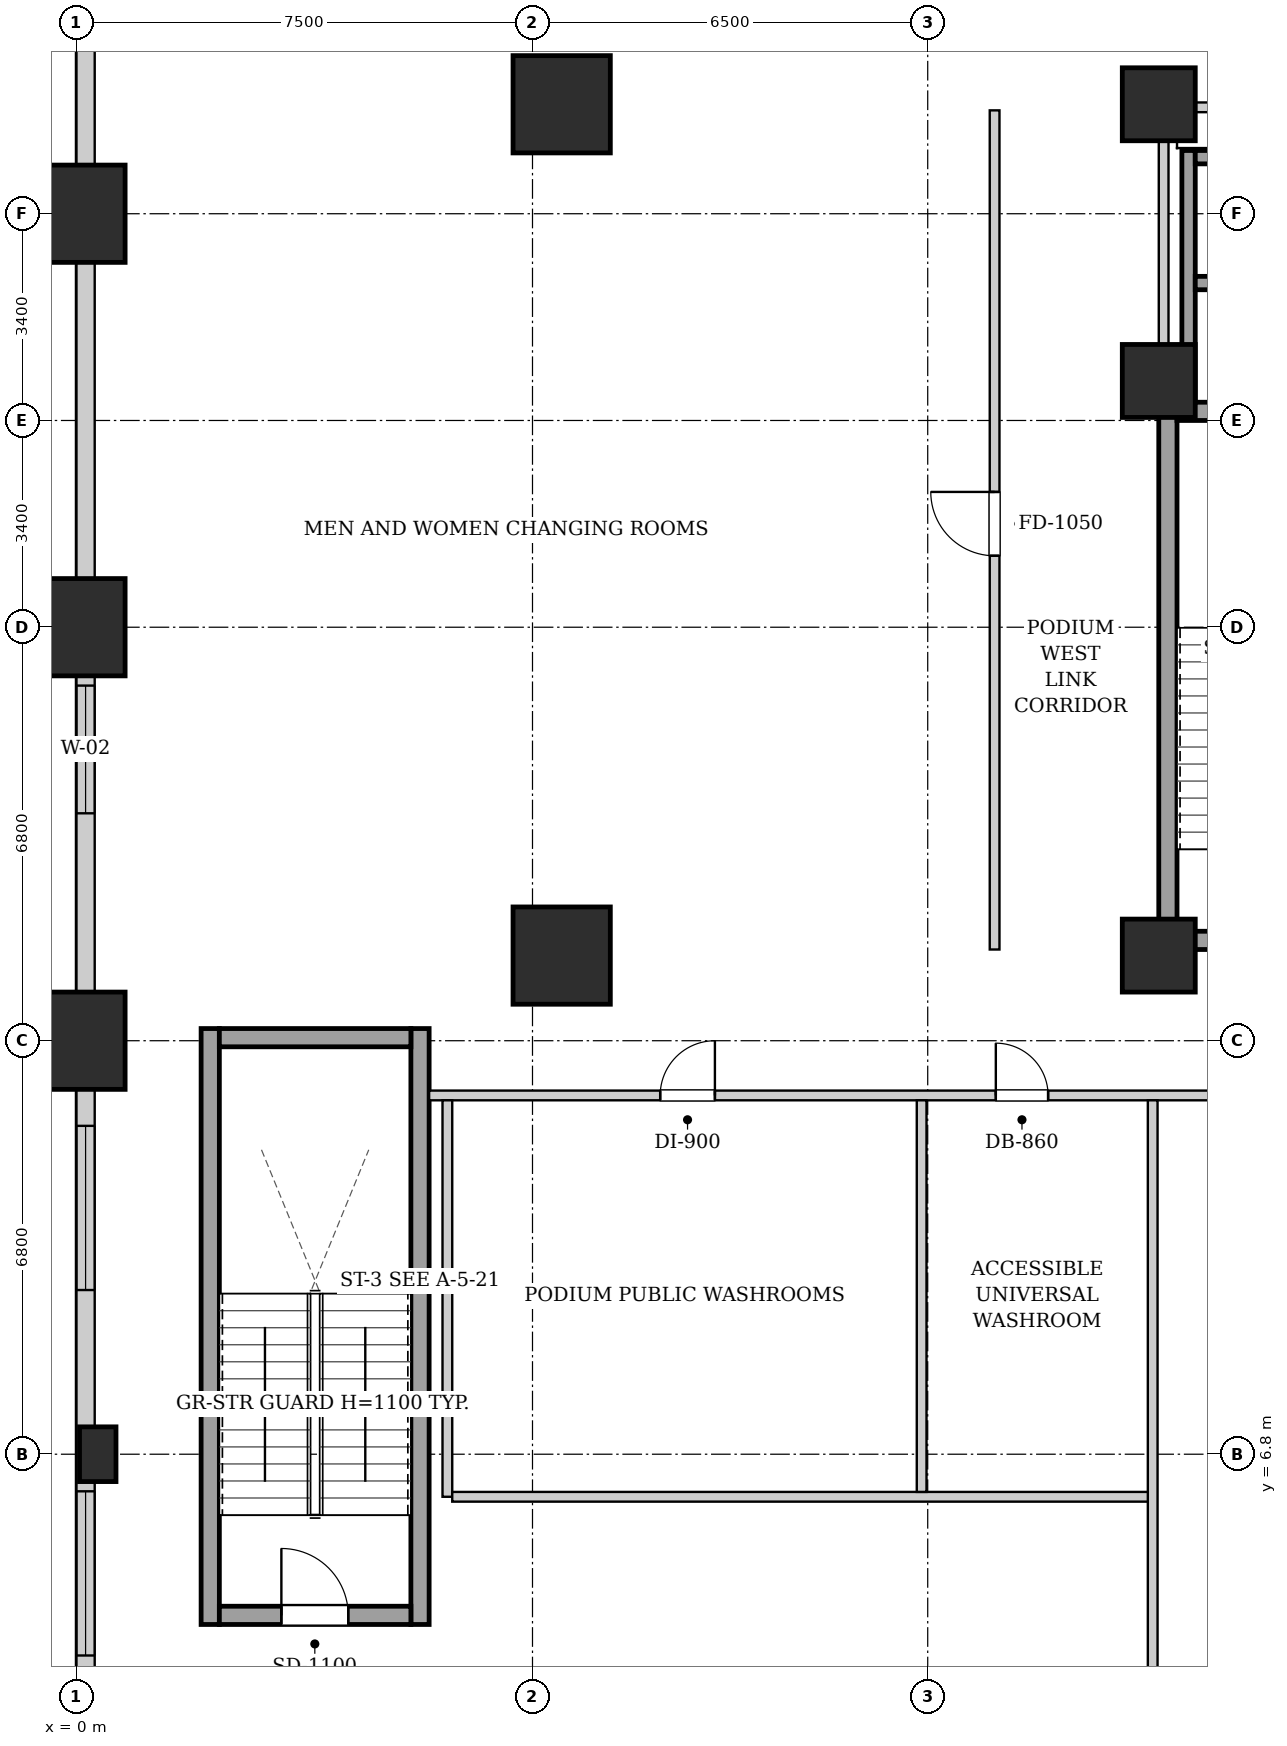
"""IFC4 building model, lengths in metres.
Left out: names, types, materials, properties, quantities, classifications, styles, units other than length and angle.
Written with IfcOpenShell. Run it as: python <this file> out.ifc"""

import sys

from ifc_helpers import new_model, si_unit, direction, frame, frame_2d, origin, origin_2d, place, context, subcontext, project, spatial, rectangle, extrude, element, fill, save


model = new_model("IFC4")
c1 = context("Model", 3, precision=1e-05, world=origin(), true_north=direction((0.0, 1.0)))
c2 = subcontext(c1, "Body", "Model", "MODEL_VIEW")
j1 = project(units=[si_unit("LENGTHUNIT", "METRE"), si_unit("PLANEANGLEUNIT", "RADIAN")], contexts=[c1])
p1 = place(None, origin())
s1 = spatial("IfcSite", under=j1, at=p1, CompositionType="ELEMENT")
p2 = place(p1, origin())
s2 = spatial("IfcBuilding", under=s1, at=p2, CompositionType="ELEMENT")
p3 = place(p2, frame((0.0, 0.0, 16.0)))
s3 = spatial("IfcBuildingStorey", under=s2, at=p3, CompositionType="ELEMENT", Elevation=16.0)
for number, where, z_axis, x_axis in (
    (1, (0.0, 13.6, 0.0), (0.0, 0.0, 1.0), (1.0, 0.0, 0.0)),
    (2, (0.0, 20.4, 0.0), (0.0, 0.0, 1.0), (1.0, 0.0, 0.0)),
    (3, (0.0, 27.2, 0.0), (0.0, 0.0, 1.0), (1.0, 0.0, 0.0)),
    (4, (7.98, 15.0, 0.0), (0.0, 0.0, 1.0), (1.0, 0.0, 0.0)),
    (5, (7.98, 29.0, 0.0), (0.0, 0.0, 1.0), (1.0, 0.0, 0.0)),
):
    element("IfcColumn", number, at=place(p3, frame(where, z_axis=z_axis, x_axis=x_axis)), inside=s3, PredefinedType="COLUMN", context=c2, shape_type="SweptSolid", body=[
        extrude(rectangle(XDim=1.6, YDim=1.6, at=origin_2d()), origin(), (0.0, 0.0, 1.0), 4.8),
    ])
for number, where, z_axis, x_axis in (
    (6, (17.8, 15.0, 0.0), (0.0, 0.0, 1.0), (1.0, 0.0, 0.0)),
    (7, (17.8, 29.0, 0.0), (0.0, 0.0, 1.0), (1.0, 0.0, 0.0)),
    (8, (17.8, 24.45, 0.0), (0.0, 0.0, 1.0), (1.0, 0.0, 0.0)),
):
    element("IfcColumn", number, at=place(p3, frame(where, z_axis=z_axis, x_axis=x_axis)), inside=s3, PredefinedType="COLUMN", context=c2, shape_type="SweptSolid", body=[
        extrude(rectangle(XDim=1.2, YDim=1.2, at=origin_2d()), origin(), (0.0, 0.0, 1.0), 4.8),
    ])
p4 = place(p3, frame((0.35, 6.8, 0.0), z_axis=(0.0, 0.0, 1.0), x_axis=(1.0, 0.0, 0.0)))
e9 = element("IfcColumn", 9, at=p4, inside=s3, PredefinedType="PILASTER", context=c2, shape_type="SweptSolid", body=[
    extrude(rectangle(XDim=0.6, YDim=0.9, at=origin_2d()), origin(), (0.0, 0.0, 1.0), 4.8),
])
p5 = place(p3, frame((0.15, 0.16, 0.0), z_axis=(0.0, 0.0, 1.0), x_axis=(0.0, 1.0, 0.0)))
e10 = element("IfcWall", 10, at=p5, inside=s3, PredefinedType="SOLIDWALL", context=c2, shape_type="SweptSolid", body=[
    extrude(rectangle(XDim=47.28, YDim=0.3, at=frame_2d((23.64, 0.0))), origin(), (0.0, 0.0, 1.0), 3.235),
])
p6 = place(p5, frame((3.33, 0.0, 0.9)))
e11 = element("IfcOpeningElement", 11, at=p6, cuts=e10, PredefinedType="OPENING", context=c2, shape_type="SweptSolid", body=[
    extrude(rectangle(XDim=2.7, YDim=2.1, at=frame_2d((1.35, 1.05))), frame((0.0, 0.16, 0.0), z_axis=(0.0, -1.0, 0.0), x_axis=(1.0, 0.0, 0.0)), (0.0, 0.0, 1.0), 0.32),
])
p7 = place(p5, frame((9.34, 0.0, 0.9)))
e12 = element("IfcOpeningElement", 12, at=p7, cuts=e10, PredefinedType="OPENING", context=c2, shape_type="SweptSolid", body=[
    extrude(rectangle(XDim=2.7, YDim=2.1, at=frame_2d((1.35, 1.05))), frame((0.0, 0.16, 0.0), z_axis=(0.0, -1.0, 0.0), x_axis=(1.0, 0.0, 0.0)), (0.0, 0.0, 1.0), 0.32),
])
p8 = place(p5, frame((17.18, 0.0, 0.85)))
e13 = element("IfcOpeningElement", 13, at=p8, cuts=e10, PredefinedType="OPENING", context=c2, shape_type="SweptSolid", body=[
    extrude(rectangle(XDim=2.1, YDim=1.85, at=frame_2d((1.05, 0.925))), frame((0.0, 0.16, 0.0), z_axis=(0.0, -1.0, 0.0), x_axis=(1.0, 0.0, 0.0)), (0.0, 0.0, 1.0), 0.32),
])
p9 = place(p5, frame((36.5, 0.0, 0.9)))
e14 = element("IfcOpeningElement", 14, at=p9, cuts=e10, PredefinedType="OPENING", context=c2, shape_type="SweptSolid", body=[
    extrude(rectangle(XDim=2.7, YDim=2.1, at=frame_2d((1.35, 1.05))), frame((0.0, 0.16, 0.0), z_axis=(0.0, -1.0, 0.0), x_axis=(1.0, 0.0, 0.0)), (0.0, 0.0, 1.0), 0.32),
])
p10 = place(p5, frame((43.0, 0.0, 0.9)))
e15 = element("IfcOpeningElement", 15, at=p10, cuts=e10, PredefinedType="OPENING", context=c2, shape_type="SweptSolid", body=[
    extrude(rectangle(XDim=2.7, YDim=2.1, at=frame_2d((1.35, 1.05))), frame((0.0, 0.16, 0.0), z_axis=(0.0, -1.0, 0.0), x_axis=(1.0, 0.0, 0.0)), (0.0, 0.0, 1.0), 0.32),
])
p11 = place(p3, frame((17.95, 15.1, 0.0), z_axis=(0.0, 0.0, 1.0), x_axis=(0.0, 1.0, 0.0)))
e16 = element("IfcWall", 16, at=p11, inside=s3, PredefinedType="SHEAR", context=c2, shape_type="SweptSolid", body=[
    extrude(rectangle(XDim=9.0, YDim=0.3, at=frame_2d((4.5, 0.0))), origin(), (0.0, 0.0, 1.0), 4.35),
])
p12 = place(p3, frame((18.1, 23.95, 0.0), z_axis=(0.0, 0.0, 1.0), x_axis=(1.0, 0.0, 0.0)))
e17 = element("IfcWall", 17, at=p12, inside=s3, PredefinedType="SHEAR", context=c2, shape_type="SweptSolid", body=[
    extrude(rectangle(XDim=2.85, YDim=0.3, at=frame_2d((1.425, 0.0))), origin(), (0.0, 0.0, 1.0), 4.35),
])
p13 = place(p3, frame((18.1, 15.25, 0.0), z_axis=(0.0, 0.0, 1.0), x_axis=(1.0, 0.0, 0.0)))
e18 = element("IfcWall", 18, at=p13, inside=s3, PredefinedType="SHEAR", context=c2, shape_type="SweptSolid", body=[
    extrude(rectangle(XDim=2.85, YDim=0.3, at=frame_2d((1.425, 0.0))), origin(), (0.0, 0.0, 1.0), 4.35),
])
p14 = place(p13, frame((0.86, 0.0, 0.0)))
e19 = element("IfcOpeningElement", 19, at=p14, cuts=e18, PredefinedType="OPENING", context=c2, shape_type="SweptSolid", body=[
    extrude(rectangle(XDim=1.1, YDim=2.05, at=frame_2d((0.55, 1.025))), frame((0.0, 0.16, 0.0), z_axis=(0.0, -1.0, 0.0), x_axis=(1.0, 0.0, 0.0)), (0.0, 0.0, 1.0), 0.32),
])
for number, where, z_axis, x_axis in (
    (20, (2.2, 4.0, 0.0), (0.0, 0.0, 1.0), (0.0, 1.0, 0.0)),
    (21, (5.65, 4.0, 0.0), (0.0, 0.0, 1.0), (0.0, 1.0, 0.0)),
):
    element("IfcWall", number, at=place(p3, frame(where, z_axis=z_axis, x_axis=x_axis)), inside=s3, PredefinedType="SHEAR", context=c2, shape_type="SweptSolid", body=[
        extrude(rectangle(XDim=9.8, YDim=0.3, at=frame_2d((4.9, 0.0))), origin(), (0.0, 0.0, 1.0), 4.35),
    ])
p15 = place(p3, frame((2.35, 13.65, 0.0), z_axis=(0.0, 0.0, 1.0), x_axis=(1.0, 0.0, 0.0)))
e22 = element("IfcWall", 22, at=p15, inside=s3, PredefinedType="SHEAR", context=c2, shape_type="SweptSolid", body=[
    extrude(rectangle(XDim=3.15, YDim=0.3, at=frame_2d((1.575, 0.0))), origin(), (0.0, 0.0, 1.0), 4.35),
])
p16 = place(p3, frame((2.35, 4.15, 0.0), z_axis=(0.0, 0.0, 1.0), x_axis=(1.0, 0.0, 0.0)))
e23 = element("IfcWall", 23, at=p16, inside=s3, PredefinedType="SHEAR", context=c2, shape_type="SweptSolid", body=[
    extrude(rectangle(XDim=3.15, YDim=0.3, at=frame_2d((1.575, 0.0))), origin(), (0.0, 0.0, 1.0), 4.35),
])
p17 = place(p16, frame((1.02, 0.0, 0.0)))
e24 = element("IfcOpeningElement", 24, at=p17, cuts=e23, PredefinedType="OPENING", context=c2, shape_type="SweptSolid", body=[
    extrude(rectangle(XDim=1.1, YDim=2.05, at=frame_2d((0.55, 1.025))), frame((0.0, 0.16, 0.0), z_axis=(0.0, -1.0, 0.0), x_axis=(1.0, 0.0, 0.0)), (0.0, 0.0, 1.0), 0.32),
])
p18 = place(p3, frame((18.29, 24.1, 0.0), z_axis=(0.0, 0.0, 1.0), x_axis=(0.0, 1.0, 0.0)))
e25 = element("IfcWall", 25, at=p18, inside=s3, PredefinedType="SHEAR", context=c2, shape_type="SweptSolid", body=[
    extrude(rectangle(XDim=4.14, YDim=0.22, at=frame_2d((2.07, 0.0))), origin(), (0.0, 0.0, 1.0), 4.35),
])
for number, where, z_axis, x_axis in (
    (26, (18.4, 26.06, 0.0), (0.0, 0.0, 1.0), (1.0, 0.0, 0.0)),
    (27, (18.4, 28.13, 0.0), (0.0, 0.0, 1.0), (1.0, 0.0, 0.0)),
):
    element("IfcWall", number, at=place(p3, frame(where, z_axis=z_axis, x_axis=x_axis)), inside=s3, PredefinedType="SHEAR", context=c2, shape_type="SweptSolid", body=[
        extrude(rectangle(XDim=1.9, YDim=0.22, at=frame_2d((0.95, 0.0))), origin(), (0.0, 0.0, 1.0), 4.35),
    ])
p19 = place(p3, frame((17.88, 24.12, 0.0), z_axis=(0.0, 0.0, 1.0), x_axis=(0.0, 1.0, 0.0)))
e28 = element("IfcWall", 28, at=p19, inside=s3, PredefinedType="PARTITIONING", context=c2, shape_type="SweptSolid", body=[
    extrude(rectangle(XDim=4.76, YDim=0.16, at=frame_2d((2.38, 0.0))), origin(), (0.0, 0.0, 1.0), 4.35),
])
p20 = place(p3, frame((17.96, 28.95, 0.0), z_axis=(0.0, 0.0, 1.0), x_axis=(1.0, 0.0, 0.0)))
e29 = element("IfcWall", 29, at=p20, inside=s3, PredefinedType="PARTITIONING", context=c2, shape_type="SweptSolid", body=[
    extrude(rectangle(XDim=4.29, YDim=0.16, at=frame_2d((2.145, 0.0))), origin(), (0.0, 0.0, 1.0), 4.35),
])
p21 = place(p20, frame((1.57, 0.0, 0.0)))
e30 = element("IfcOpeningElement", 30, at=p21, cuts=e29, PredefinedType="OPENING", context=c2, shape_type="SweptSolid", body=[
    extrude(rectangle(XDim=0.86, YDim=2.05, at=frame_2d((0.43, 1.025))), frame((0.0, 0.09, 0.0), z_axis=(0.0, -1.0, 0.0), x_axis=(1.0, 0.0, 0.0)), (0.0, 0.0, 1.0), 0.18),
])
p22 = place(p3, frame((5.8, 12.7, 0.0), z_axis=(0.0, 0.0, 1.0), x_axis=(1.0, 0.0, 0.0)))
e31 = element("IfcWall", 31, at=p22, inside=s3, PredefinedType="PARTITIONING", context=c2, shape_type="SweptSolid", body=[
    extrude(rectangle(XDim=47.92, YDim=0.16, at=frame_2d((23.96, 0.0))), origin(), (0.0, 0.0, 1.0), 4.35),
])
p23 = place(p22, frame((3.8, 0.0, 0.0)))
e32 = element("IfcOpeningElement", 32, at=p23, cuts=e31, PredefinedType="OPENING", context=c2, shape_type="SweptSolid", body=[
    extrude(rectangle(XDim=0.9, YDim=2.05, at=frame_2d((0.45, 1.025))), frame((0.0, 0.09, 0.0), z_axis=(0.0, -1.0, 0.0), x_axis=(1.0, 0.0, 0.0)), (0.0, 0.0, 1.0), 0.18),
])
p24 = place(p22, frame((9.32, 0.0, 0.0)))
e33 = element("IfcOpeningElement", 33, at=p24, cuts=e31, PredefinedType="OPENING", context=c2, shape_type="SweptSolid", body=[
    extrude(rectangle(XDim=0.86, YDim=2.05, at=frame_2d((0.43, 1.025))), frame((0.0, 0.09, 0.0), z_axis=(0.0, -1.0, 0.0), x_axis=(1.0, 0.0, 0.0)), (0.0, 0.0, 1.0), 0.18),
])
p25 = place(p22, frame((18.975, 0.0, 0.0)))
e34 = element("IfcOpeningElement", 34, at=p25, cuts=e31, PredefinedType="OPENING", context=c2, shape_type="SweptSolid", body=[
    extrude(rectangle(XDim=1.05, YDim=2.05, at=frame_2d((0.525, 1.025))), frame((0.0, 0.09, 0.0), z_axis=(0.0, -1.0, 0.0), x_axis=(1.0, 0.0, 0.0)), (0.0, 0.0, 1.0), 0.18),
])
p26 = place(p22, frame((35.09, 0.0, 0.0)))
e35 = element("IfcOpeningElement", 35, at=p26, cuts=e31, PredefinedType="OPENING", context=c2, shape_type="SweptSolid", body=[
    extrude(rectangle(XDim=1.05, YDim=2.05, at=frame_2d((0.525, 1.025))), frame((0.0, 0.09, 0.0), z_axis=(0.0, -1.0, 0.0), x_axis=(1.0, 0.0, 0.0)), (0.0, 0.0, 1.0), 0.18),
])
p27 = place(p3, frame((6.1, 6.1, 0.0), z_axis=(0.0, 0.0, 1.0), x_axis=(0.0, 1.0, 0.0)))
e36 = element("IfcWall", 36, at=p27, inside=s3, PredefinedType="PARTITIONING", context=c2, shape_type="SweptSolid", body=[
    extrude(rectangle(XDim=6.52, YDim=0.16, at=frame_2d((3.26, 0.0))), origin(), (0.0, 0.0, 1.0), 4.35),
])
p28 = place(p3, frame((6.18, 6.1, 0.0), z_axis=(0.0, 0.0, 1.0), x_axis=(1.0, 0.0, 0.0)))
e37 = element("IfcWall", 37, at=p28, inside=s3, PredefinedType="PARTITIONING", context=c2, shape_type="SweptSolid", body=[
    extrude(rectangle(XDim=11.5, YDim=0.16, at=frame_2d((5.75, 0.0))), origin(), (0.0, 0.0, 1.0), 4.35),
])
p29 = place(p3, frame((13.9, 6.18, 0.0), z_axis=(0.0, 0.0, 1.0), x_axis=(0.0, 1.0, 0.0)))
e38 = element("IfcWall", 38, at=p29, inside=s3, PredefinedType="PARTITIONING", context=c2, shape_type="SweptSolid", body=[
    extrude(rectangle(XDim=6.44, YDim=0.16, at=frame_2d((3.22, 0.0))), origin(), (0.0, 0.0, 1.0), 4.35),
])
p30 = place(p3, frame((17.7, 0.6, 0.0), z_axis=(0.0, 0.0, 1.0), x_axis=(0.0, 1.0, 0.0)))
e39 = element("IfcWall", 39, at=p30, inside=s3, PredefinedType="PARTITIONING", context=c2, shape_type="SweptSolid", body=[
    extrude(rectangle(XDim=12.02, YDim=0.16, at=frame_2d((6.01, 0.0))), origin(), (0.0, 0.0, 1.0), 3.435),
])
p31 = place(p3, frame((15.1, 15.1, 0.0), z_axis=(0.0, 0.0, 1.0), x_axis=(0.0, 1.0, 0.0)))
e40 = element("IfcWall", 40, at=p31, inside=s3, PredefinedType="PARTITIONING", context=c2, shape_type="SweptSolid", body=[
    extrude(rectangle(XDim=13.8, YDim=0.16, at=frame_2d((6.9, 0.0))), origin(), (0.0, 0.0, 1.0), 4.35),
])
p32 = place(p31, frame((6.475, 0.0, 0.0)))
e41 = element("IfcOpeningElement", 41, at=p32, cuts=e40, PredefinedType="OPENING", context=c2, shape_type="SweptSolid", body=[
    extrude(rectangle(XDim=1.05, YDim=2.05, at=frame_2d((0.525, 1.025))), frame((0.0, 0.09, 0.0), z_axis=(0.0, -1.0, 0.0), x_axis=(1.0, 0.0, 0.0)), (0.0, 0.0, 1.0), 0.18),
])
p33 = place(p17, origin())
e42 = element("IfcDoor", 42, at=p33, inside=s3, OperationType="SINGLE_SWING_LEFT", PredefinedType="DOOR", context=c2, shape_type="SweptSolid", body=[
    extrude(rectangle(XDim=1.1, YDim=2.05, at=frame_2d((0.55, 1.025))), frame((0.0, 0.025, 0.0), z_axis=(0.0, -1.0, 0.0), x_axis=(1.0, 0.0, 0.0)), (0.0, 0.0, 1.0), 0.05),
])
fill(e24, e42)
p34 = place(p23, origin())
e43 = element("IfcDoor", 43, at=p34, inside=s3, OperationType="SINGLE_SWING_RIGHT", PredefinedType="DOOR", context=c2, shape_type="SweptSolid", body=[
    extrude(rectangle(XDim=0.9, YDim=2.05, at=frame_2d((0.45, 1.025))), frame((0.0, 0.025, 0.0), z_axis=(0.0, -1.0, 0.0), x_axis=(1.0, 0.0, 0.0)), (0.0, 0.0, 1.0), 0.05),
])
fill(e32, e43)
p35 = place(p24, origin())
e44 = element("IfcDoor", 44, at=p35, inside=s3, OperationType="SINGLE_SWING_LEFT", PredefinedType="DOOR", context=c2, shape_type="SweptSolid", body=[
    extrude(rectangle(XDim=0.86, YDim=2.05, at=frame_2d((0.43, 1.025))), frame((0.0, 0.025, 0.0), z_axis=(0.0, -1.0, 0.0), x_axis=(1.0, 0.0, 0.0)), (0.0, 0.0, 1.0), 0.05),
])
fill(e33, e44)
p36 = place(p32, origin())
e45 = element("IfcDoor", 45, at=p36, inside=s3, OperationType="SINGLE_SWING_RIGHT", PredefinedType="DOOR", context=c2, shape_type="SweptSolid", body=[
    extrude(rectangle(XDim=1.05, YDim=2.05, at=frame_2d((0.525, 1.025))), frame((0.0, 0.025, 0.0), z_axis=(0.0, -1.0, 0.0), x_axis=(1.0, 0.0, 0.0)), (0.0, 0.0, 1.0), 0.05),
])
fill(e41, e45)
p37 = place(p6, origin())
e46 = element("IfcWindow", 46, at=p37, inside=s3, PartitioningType="TRIPLE_PANEL_VERTICAL", PredefinedType="WINDOW", context=c2, shape_type="SweptSolid", body=[
    extrude(rectangle(XDim=2.7, YDim=2.1, at=frame_2d((1.35, 1.05))), frame((0.0, 0.03, 0.0), z_axis=(0.0, -1.0, 0.0), x_axis=(1.0, 0.0, 0.0)), (0.0, 0.0, 1.0), 0.06),
])
fill(e11, e46)
p38 = place(p7, origin())
e47 = element("IfcWindow", 47, at=p38, inside=s3, PartitioningType="TRIPLE_PANEL_VERTICAL", PredefinedType="WINDOW", context=c2, shape_type="SweptSolid", body=[
    extrude(rectangle(XDim=2.7, YDim=2.1, at=frame_2d((1.35, 1.05))), frame((0.0, 0.03, 0.0), z_axis=(0.0, -1.0, 0.0), x_axis=(1.0, 0.0, 0.0)), (0.0, 0.0, 1.0), 0.06),
])
fill(e12, e47)
p39 = place(p8, origin())
e48 = element("IfcWindow", 48, at=p39, inside=s3, PartitioningType="DOUBLE_PANEL_VERTICAL", PredefinedType="WINDOW", context=c2, shape_type="SweptSolid", body=[
    extrude(rectangle(XDim=2.1, YDim=1.85, at=frame_2d((1.05, 0.925))), frame((0.0, 0.03, 0.0), z_axis=(0.0, -1.0, 0.0), x_axis=(1.0, 0.0, 0.0)), (0.0, 0.0, 1.0), 0.06),
])
fill(e13, e48)
save(model, sys.argv[1])
